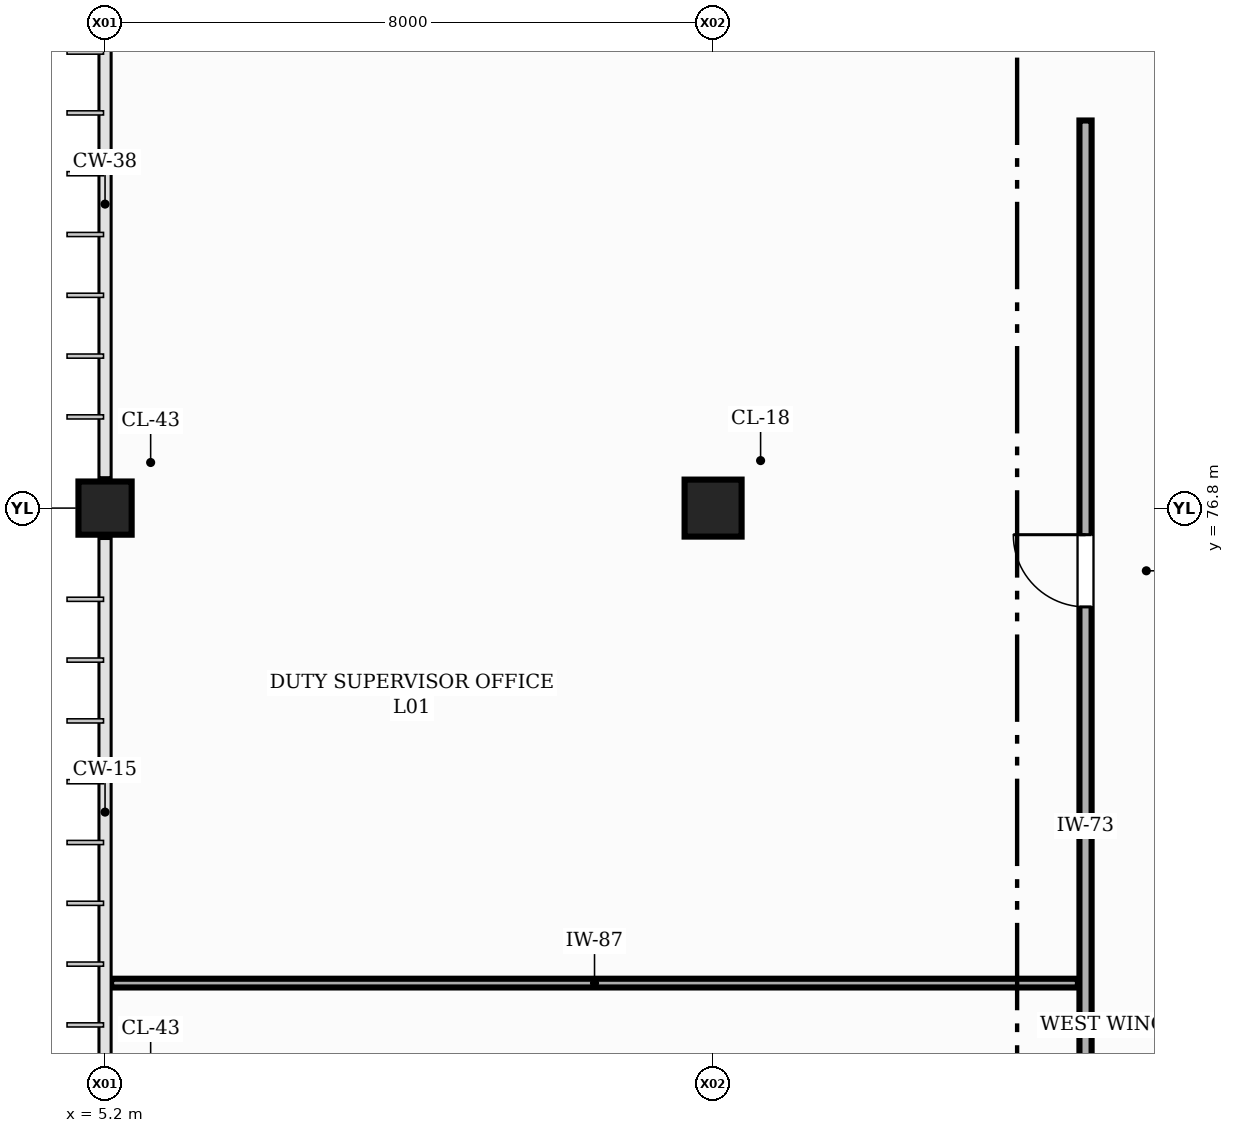
"""IFC4 building model, lengths in metres.
Left out: names, types, materials, properties, quantities, classifications, styles, units other than length and angle.
Written with IfcOpenShell. Run it as: python <this file> out.ifc"""

import sys

from ifc_helpers import new_model, si_unit, direction, frame, frame_2d, origin, origin_2d, place, context, subcontext, project, spatial, rectangle, extrude, element, fill, save


model = new_model("IFC4")
c1 = context("Model", 3, precision=1e-05, world=origin(), true_north=direction((0.0, 1.0)))
c2 = subcontext(c1, "Body", "Model", "MODEL_VIEW")
j1 = project(units=[si_unit("LENGTHUNIT", "METRE"), si_unit("PLANEANGLEUNIT", "RADIAN")], contexts=[c1])
p1 = place(None, origin())
s1 = spatial("IfcSite", under=j1, at=p1, CompositionType="ELEMENT")
p2 = place(p1, origin())
s2 = spatial("IfcBuilding", under=s1, at=p2, CompositionType="ELEMENT")
p3 = place(p2, frame((0.0, 0.0, 4.8)))
s3 = spatial("IfcBuildingStorey", under=s2, at=p3, CompositionType="ELEMENT", Elevation=4.8)
p4 = place(p3, frame((5.2, 76.8, 0.0), z_axis=(0.0, 0.0, 1.0), x_axis=(1.0, 0.0, 0.0)))
e1 = element("IfcColumn", 1, at=p4, inside=s3, PredefinedType="COLUMN", context=c2, shape_type="SweptSolid", body=[
    extrude(rectangle(XDim=0.7, YDim=0.7, at=origin_2d()), origin(), (0.0, 0.0, 1.0), 4.2),
])
p5 = place(p3, frame((13.2, 76.8, 0.0), z_axis=(0.0, 0.0, 1.0), x_axis=(1.0, 0.0, 0.0)))
e2 = element("IfcColumn", 2, at=p5, inside=s3, PredefinedType="COLUMN", context=c2, shape_type="SweptSolid", body=[
    extrude(rectangle(XDim=0.75, YDim=0.75, at=origin_2d()), origin(), (0.0, 0.0, 1.0), 4.2),
])
p6 = place(p3, frame((5.28, 70.55, 0.0), z_axis=(0.0, 0.0, 1.0), x_axis=(1.0, 0.0, 0.0)))
e3 = element("IfcWall", 3, at=p6, inside=s3, PredefinedType="PARTITIONING", context=c2, shape_type="SweptSolid", body=[
    extrude(rectangle(XDim=12.72, YDim=0.115, at=frame_2d((6.36, 0.0))), origin(), (0.0, 0.0, 1.0), 3.145),
])
p7 = place(p3, frame((18.1, 44.08, 0.0), z_axis=(0.0, 0.0, 1.0), x_axis=(0.0, 1.0, 0.0)))
e4 = element("IfcWall", 4, at=p7, inside=s3, PredefinedType="PARTITIONING", context=c2, shape_type="SweptSolid", body=[
    extrude(rectangle(XDim=37.82, YDim=0.16, at=frame_2d((18.91, 0.0))), origin(), (0.0, 0.0, 1.0), 3.145),
])
p8 = place(p7, frame((6.34, 0.0, 0.0)))
e5 = element("IfcOpeningElement", 5, at=p8, cuts=e4, PredefinedType="OPENING", context=c2, shape_type="SweptSolid", body=[
    extrude(rectangle(XDim=0.9, YDim=2.1, at=frame_2d((0.45, 1.05))), frame((0.0, 0.09, 0.0), z_axis=(0.0, -1.0, 0.0), x_axis=(1.0, 0.0, 0.0)), (0.0, 0.0, 1.0), 0.18),
])
p9 = place(p7, frame((19.5, 0.0, 0.0)))
e6 = element("IfcOpeningElement", 6, at=p9, cuts=e4, PredefinedType="OPENING", context=c2, shape_type="SweptSolid", body=[
    extrude(rectangle(XDim=0.92, YDim=2.1, at=frame_2d((0.46, 1.05))), frame((0.0, 0.09, 0.0), z_axis=(0.0, -1.0, 0.0), x_axis=(1.0, 0.0, 0.0)), (0.0, 0.0, 1.0), 0.18),
])
p10 = place(p7, frame((31.42, 0.0, 0.0)))
e7 = element("IfcOpeningElement", 7, at=p10, cuts=e4, PredefinedType="OPENING", context=c2, shape_type="SweptSolid", body=[
    extrude(rectangle(XDim=0.95, YDim=2.1, at=frame_2d((0.475, 1.05))), frame((0.0, 0.09, 0.0), z_axis=(0.0, -1.0, 0.0), x_axis=(1.0, 0.0, 0.0)), (0.0, 0.0, 1.0), 0.18),
])
p11 = place(p10, origin())
e8 = element("IfcDoor", 8, at=p11, inside=s3, OperationType="SINGLE_SWING_RIGHT", PredefinedType="DOOR", context=c2, shape_type="SweptSolid", body=[
    extrude(rectangle(XDim=0.95, YDim=2.1, at=frame_2d((0.475, 1.05))), frame((0.0, 0.025, 0.0), z_axis=(0.0, -1.0, 0.0), x_axis=(1.0, 0.0, 0.0)), (0.0, 0.0, 1.0), 0.05),
])
fill(e7, e8)
save(model, sys.argv[1])
